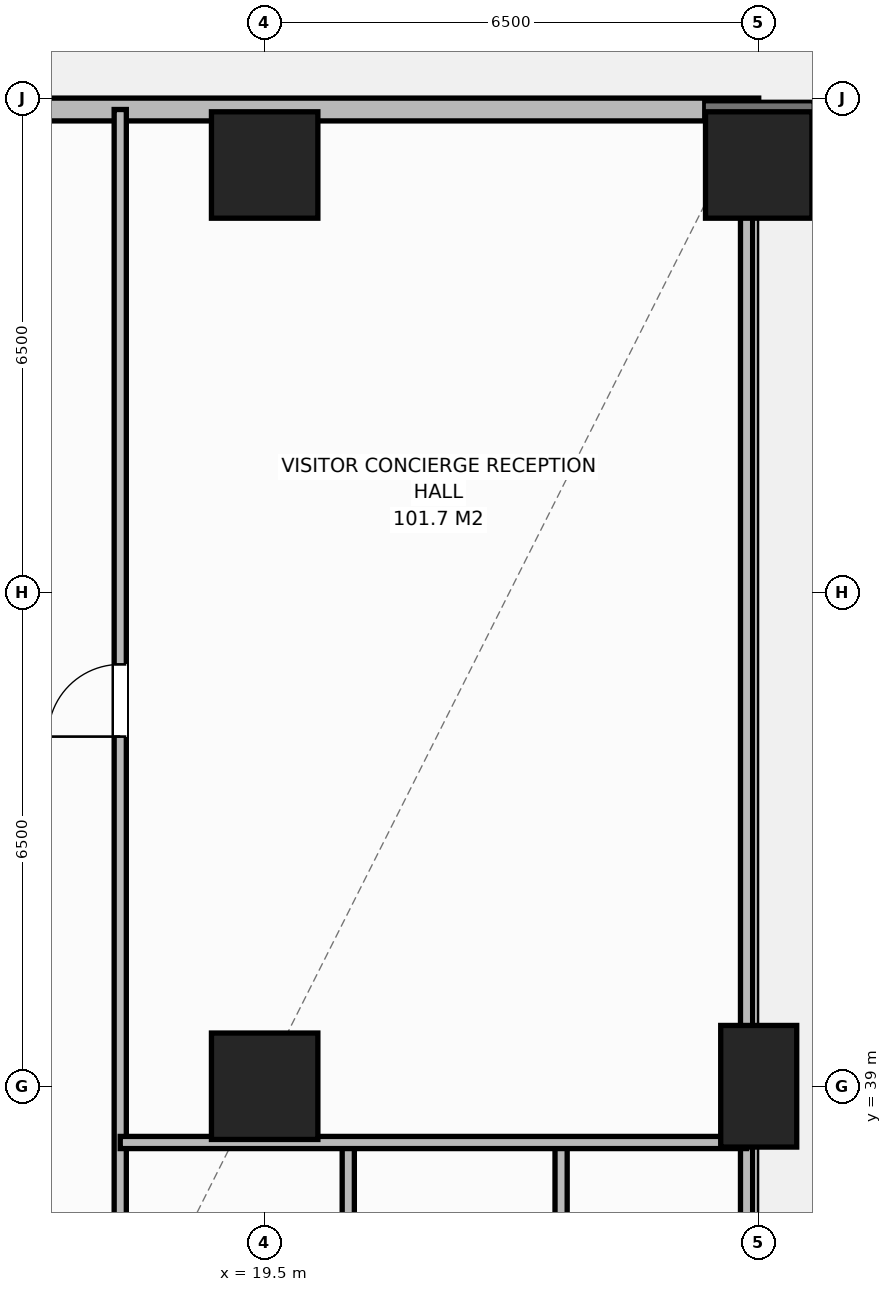
"""IFC4 building model, lengths in metres.
Left out: names, types, materials, properties, quantities, classifications, styles, units other than length and angle.
Written with IfcOpenShell. Run it as: python <this file> out.ifc"""

import sys

from ifc_helpers import new_model, si_unit, direction, frame, frame_2d, origin, origin_2d, place, context, subcontext, project, spatial, rectangle, extrude, element, fill, save


model = new_model("IFC4")
c1 = context("Model", 3, precision=1e-05, world=origin(), true_north=direction((0.0, 1.0)))
c2 = subcontext(c1, "Body", "Model", "MODEL_VIEW")
j1 = project(units=[si_unit("LENGTHUNIT", "METRE"), si_unit("PLANEANGLEUNIT", "RADIAN")], contexts=[c1])
p1 = place(None, origin())
s1 = spatial("IfcSite", under=j1, at=p1, CompositionType="ELEMENT")
p2 = place(p1, origin())
s2 = spatial("IfcBuilding", under=s1, at=p2, CompositionType="ELEMENT")
p3 = place(p2, origin())
s3 = spatial("IfcBuildingStorey", under=s2, at=p3, CompositionType="ELEMENT", Elevation=0.0)
p4 = place(p3, frame((19.5, 39.0, 0.0), z_axis=(0.0, 0.0, 1.0), x_axis=(1.0, 0.0, 0.0)))
e1 = element("IfcColumn", 1, at=p4, inside=s3, PredefinedType="COLUMN", context=c2, shape_type="SweptSolid", body=[
    extrude(rectangle(XDim=1.4, YDim=1.4, at=origin_2d()), origin(), (0.0, 0.0, 1.0), 6.0),
])
p5 = place(p3, frame((26.0, 39.0, 0.0), z_axis=(0.0, 0.0, 1.0), x_axis=(1.0, 0.0, 0.0)))
e2 = element("IfcColumn", 2, at=p5, inside=s3, PredefinedType="PILASTER", context=c2, shape_type="SweptSolid", body=[
    extrude(rectangle(XDim=1.0, YDim=1.6, at=origin_2d()), origin(), (0.0, 0.0, 1.0), 6.0),
])
for number, where, z_axis, x_axis in (
    (3, (19.5, 51.12, 0.0), (0.0, 0.0, 1.0), (1.0, 0.0, 0.0)),
    (4, (26.0, 51.12, 0.0), (0.0, 0.0, 1.0), (1.0, 0.0, 0.0)),
):
    element("IfcColumn", number, at=place(p3, frame(where, z_axis=z_axis, x_axis=x_axis)), inside=s3, PredefinedType="COLUMN", context=c2, shape_type="SweptSolid", body=[
        extrude(rectangle(XDim=1.4, YDim=1.4, at=origin_2d()), origin(), (0.0, 0.0, 1.0), 6.0),
    ])
p6 = place(p3, frame((3.0, 51.85, 0.0), z_axis=(0.0, 0.0, 1.0), x_axis=(1.0, 0.0, 0.0)))
e5 = element("IfcWall", 5, at=p6, inside=s3, PredefinedType="STANDARD", context=c2, shape_type="SweptSolid", body=[
    extrude(rectangle(XDim=23.0, YDim=0.3, at=frame_2d((11.5, 0.0))), origin(), (0.0, 0.0, 1.0), 5.72),
])
p7 = place(p6, frame((6.8, 0.0, 0.0)))
e6 = element("IfcOpeningElement", 6, at=p7, cuts=e5, PredefinedType="OPENING", context=c2, shape_type="SweptSolid", body=[
    extrude(rectangle(XDim=2.2, YDim=2.4, at=frame_2d((1.1, 1.2))), frame((0.0, 0.16, 0.0), z_axis=(0.0, -1.0, 0.0), x_axis=(1.0, 0.0, 0.0)), (0.0, 0.0, 1.0), 0.32),
])
p8 = place(p3, frame((25.84, 35.6, 0.0), z_axis=(0.0, 0.0, 1.0), x_axis=(0.0, 1.0, 0.0)))
e7 = element("IfcWall", 7, at=p8, inside=s3, PredefinedType="STANDARD", context=c2, shape_type="SweptSolid", body=[
    extrude(rectangle(XDim=16.25, YDim=0.16, at=frame_2d((8.125, 0.0))), origin(), (0.0, 0.0, 1.0), 4.92),
])
p9 = place(p3, frame((17.6, 35.6, 0.0), z_axis=(0.0, 0.0, 1.0), x_axis=(0.0, 1.0, 0.0)))
e8 = element("IfcWall", 8, at=p9, inside=s3, PredefinedType="STANDARD", context=c2, shape_type="SweptSolid", body=[
    extrude(rectangle(XDim=16.25, YDim=0.16, at=frame_2d((8.125, 0.0))), origin(), (0.0, 0.0, 1.0), 5.72),
])
p10 = place(p9, frame((8.0, 0.0, 0.0)))
e9 = element("IfcOpeningElement", 9, at=p10, cuts=e8, PredefinedType="OPENING", context=c2, shape_type="SweptSolid", body=[
    extrude(rectangle(XDim=0.95, YDim=2.15, at=frame_2d((0.475, 1.075))), frame((0.0, 0.09, 0.0), z_axis=(0.0, -1.0, 0.0), x_axis=(1.0, 0.0, 0.0)), (0.0, 0.0, 1.0), 0.18),
])
for number, where, z_axis, x_axis in (
    (10, (20.6, 35.6, 0.0), (0.0, 0.0, 1.0), (0.0, 1.0, 0.0)),
    (11, (23.4, 35.6, 0.0), (0.0, 0.0, 1.0), (0.0, 1.0, 0.0)),
):
    element("IfcWall", number, at=place(p3, frame(where, z_axis=z_axis, x_axis=x_axis)), inside=s3, PredefinedType="STANDARD", context=c2, shape_type="SweptSolid", body=[
        extrude(rectangle(XDim=2.66, YDim=0.16, at=frame_2d((1.33, 0.0))), origin(), (0.0, 0.0, 1.0), 5.72),
    ])
p11 = place(p3, frame((17.6, 38.26, 0.0), z_axis=(0.0, 0.0, 1.0), x_axis=(1.0, 0.0, 0.0)))
e12 = element("IfcWall", 12, at=p11, inside=s3, PredefinedType="STANDARD", context=c2, shape_type="SweptSolid", body=[
    extrude(rectangle(XDim=8.24, YDim=0.16, at=frame_2d((4.12, 0.0))), origin(), (0.0, 0.0, 1.0), 5.72),
])
p12 = place(p10, origin())
e13 = element("IfcDoor", 13, at=p12, inside=s3, OperationType="SINGLE_SWING_LEFT", PredefinedType="DOOR", context=c2, shape_type="SweptSolid", body=[
    extrude(rectangle(XDim=0.95, YDim=2.15, at=frame_2d((0.475, 1.075))), frame((0.0, 0.025, 0.0), z_axis=(0.0, -1.0, 0.0), x_axis=(1.0, 0.0, 0.0)), (0.0, 0.0, 1.0), 0.05),
])
fill(e9, e13)
save(model, sys.argv[1])
